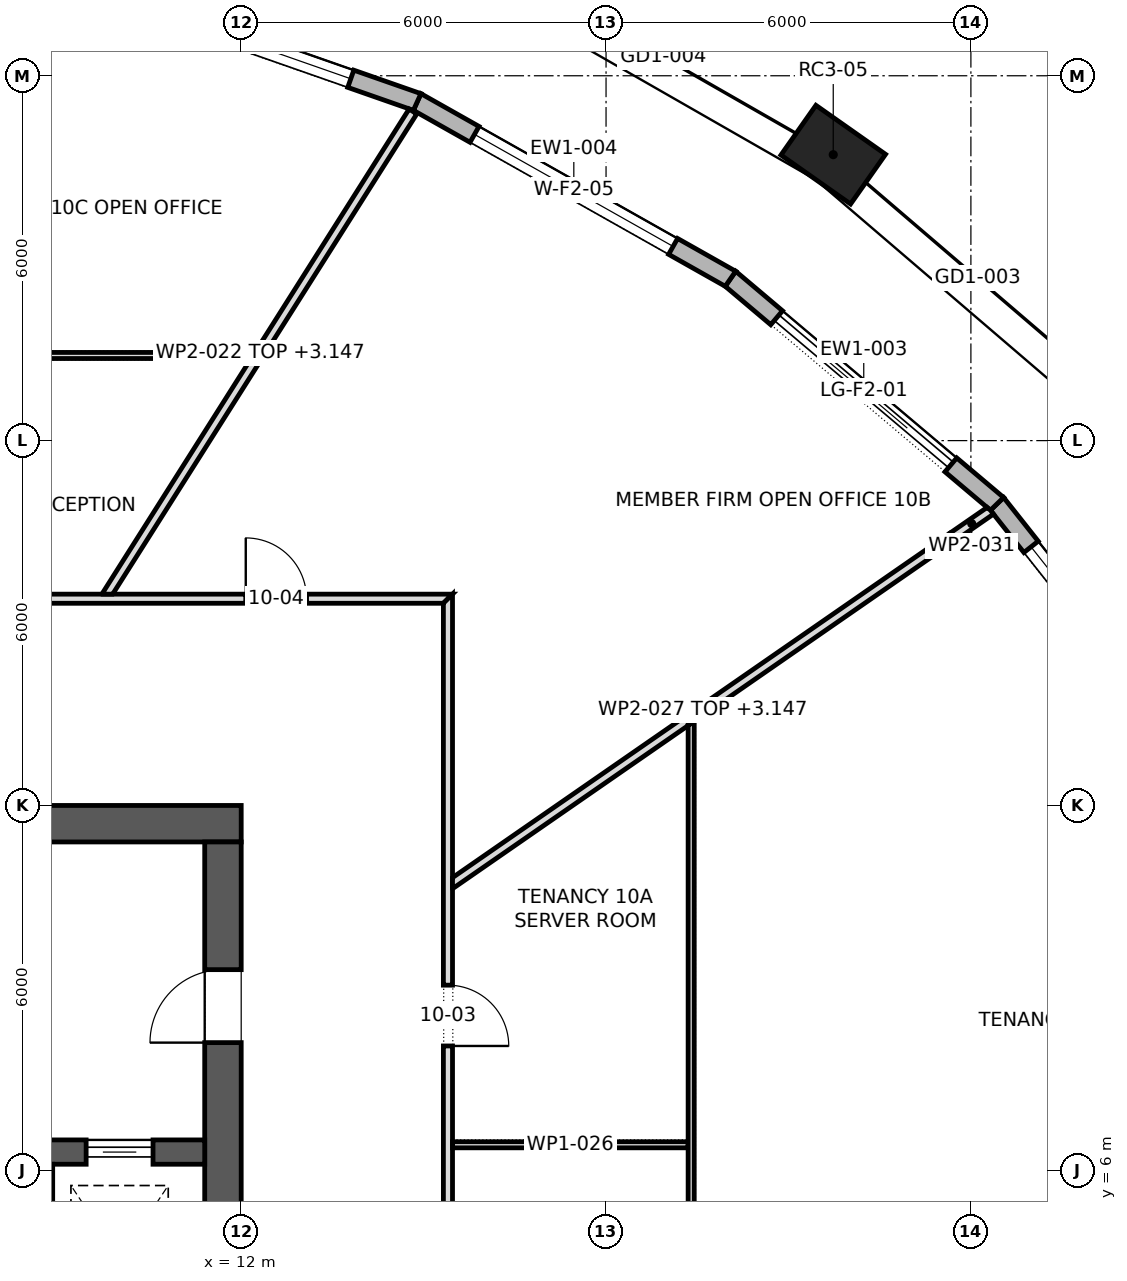
"""IFC4 building model, lengths in metres.
Left out: names, types, materials, properties, quantities, classifications, styles, units other than length and angle.
Written with IfcOpenShell. Run it as: python <this file> out.ifc"""

import sys

from ifc_helpers import new_model, si_unit, direction, frame, frame_2d, origin, origin_2d, place, context, subcontext, project, spatial, polyline, rectangle, outline, extrude, element, fill, save


model = new_model("IFC4")
c1 = context("Model", 3, precision=1e-05, world=origin(), true_north=direction((0.0, 1.0)))
c2 = subcontext(c1, "Body", "Model", "MODEL_VIEW")
j1 = project(units=[si_unit("LENGTHUNIT", "METRE"), si_unit("PLANEANGLEUNIT", "RADIAN")], contexts=[c1])
p1 = place(None, origin())
s1 = spatial("IfcSite", under=j1, at=p1, CompositionType="ELEMENT")
p2 = place(p1, origin())
s2 = spatial("IfcBuilding", under=s1, at=p2, CompositionType="ELEMENT")
p3 = place(p2, frame((0.0, 0.0, 142.3)))
s3 = spatial("IfcBuildingStorey", under=s2, at=p3, CompositionType="ELEMENT", Elevation=142.3)
p4 = place(p3, frame((21.736, 22.702, 0.0), z_axis=(0.0, 0.0, 1.0), x_axis=(-0.817907783846, 0.57534933486, 0.0)))
e1 = element("IfcColumn", 1, at=p4, inside=s3, PredefinedType="COLUMN", context=c2, shape_type="SweptSolid", body=[
    extrude(rectangle(XDim=1.4, YDim=1.0, at=origin_2d()), origin(), (0.0, 0.0, 1.0), 4.2),
])
p5 = place(p3, frame((-12.0, 11.7, 0.0), z_axis=(0.0, 0.0, 1.0), x_axis=(1.0, 0.0, 0.0)))
e2 = element("IfcWall", 2, at=p5, inside=s3, PredefinedType="SHEAR", context=c2, shape_type="SweptSolid", body=[
    extrude(rectangle(XDim=24.0, YDim=0.6, at=frame_2d((12.0, 0.0))), origin(), (0.0, 0.0, 1.0), 4.2),
])
p6 = place(p5, frame((9.225, 0.0, 0.0)))
e3 = element("IfcOpeningElement", 3, at=p6, cuts=e2, PredefinedType="OPENING", context=c2, shape_type="SweptSolid", body=[
    extrude(rectangle(XDim=0.9, YDim=2.1, at=frame_2d((0.45, 1.05))), frame((0.0, 0.312, 0.0), z_axis=(0.0, -1.0, 0.0), x_axis=(1.0, 0.0, 0.0)), (0.0, 0.0, 1.0), 0.624),
])
p7 = place(p5, frame((10.925, 0.0, 0.0)))
e4 = element("IfcOpeningElement", 4, at=p7, cuts=e2, PredefinedType="OPENING", context=c2, shape_type="SweptSolid", body=[
    extrude(rectangle(XDim=0.8, YDim=2.1, at=frame_2d((0.4, 1.05))), frame((0.0, 0.312, 0.0), z_axis=(0.0, -1.0, 0.0), x_axis=(1.0, 0.0, 0.0)), (0.0, 0.0, 1.0), 0.624),
])
p8 = place(p5, frame((4.2, 0.0, 0.0)))
e5 = element("IfcOpeningElement", 5, at=p8, cuts=e2, PredefinedType="OPENING", context=c2, shape_type="SweptSolid", body=[
    extrude(rectangle(XDim=0.8, YDim=2.1, at=frame_2d((0.4, 1.05))), frame((0.0, 0.312, 0.0), z_axis=(0.0, -1.0, 0.0), x_axis=(1.0, 0.0, 0.0)), (0.0, 0.0, 1.0), 0.624),
])
p9 = place(p5, frame((13.8, 0.0, 0.0)))
e6 = element("IfcOpeningElement", 6, at=p9, cuts=e2, PredefinedType="OPENING", context=c2, shape_type="SweptSolid", body=[
    extrude(rectangle(XDim=0.8, YDim=2.1, at=frame_2d((0.4, 1.05))), frame((0.0, 0.312, 0.0), z_axis=(0.0, -1.0, 0.0), x_axis=(1.0, 0.0, 0.0)), (0.0, 0.0, 1.0), 0.624),
])
p10 = place(p5, frame((16.6, 0.0, 0.0)))
e7 = element("IfcOpeningElement", 7, at=p10, cuts=e2, PredefinedType="OPENING", context=c2, shape_type="SweptSolid", body=[
    extrude(rectangle(XDim=0.8, YDim=2.1, at=frame_2d((0.4, 1.05))), frame((0.0, 0.312, 0.0), z_axis=(0.0, -1.0, 0.0), x_axis=(1.0, 0.0, 0.0)), (0.0, 0.0, 1.0), 0.624),
])
p11 = place(p3, frame((11.7, -11.4, 0.0), z_axis=(0.0, 0.0, 1.0), x_axis=(0.0, 1.0, 0.0)))
e8 = element("IfcWall", 8, at=p11, inside=s3, PredefinedType="SHEAR", context=c2, shape_type="SweptSolid", body=[
    extrude(rectangle(XDim=22.8, YDim=0.6, at=frame_2d((11.4, 0.0))), origin(), (0.0, 0.0, 1.0), 4.2),
])
p12 = place(p11, frame((10.2, 0.0, 0.0)))
e9 = element("IfcOpeningElement", 9, at=p12, cuts=e8, PredefinedType="OPENING", context=c2, shape_type="SweptSolid", body=[
    extrude(rectangle(XDim=2.4, YDim=2.1, at=frame_2d((1.2, 1.05))), frame((0.0, 0.312, 0.0), z_axis=(0.0, -1.0, 0.0), x_axis=(1.0, 0.0, 0.0)), (0.0, 0.0, 1.0), 0.624),
])
p13 = place(p11, frame((19.5, 0.0, 0.0)))
e10 = element("IfcOpeningElement", 10, at=p13, cuts=e8, PredefinedType="OPENING", context=c2, shape_type="SweptSolid", body=[
    extrude(rectangle(XDim=1.2, YDim=2.1, at=frame_2d((0.6, 1.05))), frame((0.0, 0.312, 0.0), z_axis=(0.0, -1.0, 0.0), x_axis=(1.0, 0.0, 0.0)), (0.0, 0.0, 1.0), 0.624),
])
p14 = place(p11, frame((2.1, 0.0, 0.0)))
e11 = element("IfcOpeningElement", 11, at=p14, cuts=e8, PredefinedType="OPENING", context=c2, shape_type="SweptSolid", body=[
    extrude(rectangle(XDim=1.2, YDim=2.1, at=frame_2d((0.6, 1.05))), frame((0.0, 0.312, 0.0), z_axis=(0.0, -1.0, 0.0), x_axis=(1.0, 0.0, 0.0)), (0.0, 0.0, 1.0), 0.624),
])
p15 = place(p3, frame((-11.4, 6.3, 0.0), z_axis=(0.0, 0.0, 1.0), x_axis=(1.0, 0.0, 0.0)))
e12 = element("IfcWall", 12, at=p15, inside=s3, PredefinedType="SHEAR", context=c2, shape_type="SweptSolid", body=[
    extrude(rectangle(XDim=22.8, YDim=0.4, at=frame_2d((11.4, 0.0))), origin(), (0.0, 0.0, 1.0), 4.2),
])
p16 = place(p15, frame((20.85, 0.0, 0.0)))
e13 = element("IfcOpeningElement", 13, at=p16, cuts=e12, PredefinedType="OPENING", context=c2, shape_type="SweptSolid", body=[
    extrude(rectangle(XDim=1.1, YDim=2.1, at=frame_2d((0.55, 1.05))), frame((0.0, 0.212, 0.0), z_axis=(0.0, -1.0, 0.0), x_axis=(1.0, 0.0, 0.0)), (0.0, 0.0, 1.0), 0.424),
])
p17 = place(p3, frame((8.75, 3.2, 0.0), z_axis=(0.0, 0.0, 1.0), x_axis=(0.0, 1.0, 0.0)))
e14 = element("IfcWall", 14, at=p17, inside=s3, PredefinedType="SHEAR", context=c2, shape_type="SweptSolid", body=[
    extrude(rectangle(XDim=2.9, YDim=0.3, at=frame_2d((1.45, 0.0))), origin(), (0.0, 0.0, 1.0), 4.2),
])
p18 = place(p3, frame((27.876, 12.605, 0.0), z_axis=(0.0, 0.0, 1.0), x_axis=(-0.620520511988, 0.784190215574, 0.0)))
e15 = element("IfcWall", 15, at=p18, inside=s3, PredefinedType="STANDARD", context=c2, shape_type="SweptSolid", body=[
    extrude(outline(polyline([(-0.016, -0.15), (5.569, -0.15), (5.538, 0.15), (0.016, 0.15), (-0.016, -0.15)])), origin(), (0.0, 0.0, 1.0), 3.9),
])
p19 = place(p18, frame((0.902, 0.0, 0.6)))
e16 = element("IfcOpeningElement", 16, at=p19, cuts=e15, PredefinedType="OPENING", context=c2, shape_type="SweptSolid", body=[
    extrude(rectangle(XDim=3.75, YDim=2.85, at=frame_2d((1.875, 1.425))), frame((0.0, 0.162, 0.0), z_axis=(0.0, -1.0, 0.0), x_axis=(1.0, 0.0, 0.0)), (0.0, 0.0, 1.0), 0.324),
])
p20 = place(p3, frame((24.43, 16.96, 0.0), z_axis=(0.0, 0.0, 1.0), x_axis=(-0.764047627809, 0.64515984255, 0.0)))
e17 = element("IfcWall", 17, at=p20, inside=s3, PredefinedType="STANDARD", context=c2, shape_type="SweptSolid", body=[
    extrude(outline(polyline([(-0.015, -0.15), (5.752, -0.15), (5.723, 0.15), (0.015, 0.15), (-0.015, -0.15)])), origin(), (0.0, 0.0, 1.0), 3.9),
])
p21 = place(p20, frame((0.994, 0.0, 0.0)))
e18 = element("IfcOpeningElement", 18, at=p21, cuts=e17, PredefinedType="OPENING", context=c2, shape_type="SweptSolid", body=[
    extrude(rectangle(XDim=3.75, YDim=3.45, at=frame_2d((1.875, 1.725))), frame((0.0, 0.162, 0.0), z_axis=(0.0, -1.0, 0.0), x_axis=(1.0, 0.0, 0.0)), (0.0, 0.0, 1.0), 0.324),
])
p22 = place(p3, frame((20.046, 20.661, 0.0), z_axis=(0.0, 0.0, 1.0), x_axis=(-0.870912346166, 0.491438384028, 0.0)))
e19 = element("IfcWall", 19, at=p22, inside=s3, PredefinedType="STANDARD", context=c2, shape_type="SweptSolid", body=[
    extrude(outline(polyline([(-0.014, -0.15), (5.929, -0.15), (5.902, 0.15), (0.014, 0.15), (-0.014, -0.15)])), origin(), (0.0, 0.0, 1.0), 3.9),
])
p23 = place(p22, frame((1.083, 0.0, 0.6)))
e20 = element("IfcOpeningElement", 20, at=p23, cuts=e19, PredefinedType="OPENING", context=c2, shape_type="SweptSolid", body=[
    extrude(rectangle(XDim=3.75, YDim=2.85, at=frame_2d((1.875, 1.425))), frame((0.0, 0.162, 0.0), z_axis=(0.0, -1.0, 0.0), x_axis=(1.0, 0.0, 0.0)), (0.0, 0.0, 1.0), 0.324),
])
p24 = place(p3, frame((14.894, 23.569, 0.0), z_axis=(0.0, 0.0, 1.0), x_axis=(-0.943925510212, 0.330158494016, 0.0)))
e21 = element("IfcWall", 21, at=p24, inside=s3, PredefinedType="STANDARD", context=c2, shape_type="SweptSolid", body=[
    extrude(outline(polyline([(-0.013, -0.15), (6.076, -0.15), (6.05, 0.15), (0.013, 0.15), (-0.013, -0.15)])), origin(), (0.0, 0.0, 1.0), 3.9),
])
p25 = place(p24, frame((1.156, 0.0, 0.6)))
e22 = element("IfcOpeningElement", 22, at=p25, cuts=e21, PredefinedType="OPENING", context=c2, shape_type="SweptSolid", body=[
    extrude(rectangle(XDim=3.75, YDim=2.85, at=frame_2d((1.875, 1.425))), frame((0.0, 0.162, 0.0), z_axis=(0.0, -1.0, 0.0), x_axis=(1.0, 0.0, 0.0)), (0.0, 0.0, 1.0), 0.324),
])
p26 = place(p3, frame((-15.475, 15.4, 0.0), z_axis=(0.0, 0.0, 1.0), x_axis=(1.0, 0.0, 0.0)))
e23 = element("IfcWall", 23, at=p26, inside=s3, PredefinedType="PARTITIONING", context=c2, shape_type="SweptSolid", body=[
    extrude(outline(polyline([(0.15, -0.075), (2.066, -0.075), (3.981, -0.075), (5.897, -0.075), (7.812, -0.075), (9.728, -0.075), (11.644, -0.075), (13.56, -0.075), (15.475, -0.075), (17.391, -0.075), (19.306, -0.075), (21.222, -0.075), (23.138, -0.075), (25.053, -0.075), (26.969, -0.075), (28.885, -0.075), (30.8, -0.075), (30.95, 0.075), (29.016, 0.075), (27.081, 0.075), (25.147, 0.075), (23.212, 0.075), (21.278, 0.075), (19.344, 0.075), (17.409, 0.075), (15.475, 0.075), (13.541, 0.075), (11.606, 0.075), (9.672, 0.075), (7.738, 0.075), (5.803, 0.075), (3.869, 0.075), (1.935, 0.075), (0.0, 0.075), (0.15, -0.075)])), origin(), (0.0, 0.0, 1.0), 3.9),
])
p27 = place(p26, frame((27.55, 0.0, 0.0)))
e24 = element("IfcOpeningElement", 24, at=p27, cuts=e23, PredefinedType="OPENING", context=c2, shape_type="SweptSolid", body=[
    extrude(rectangle(XDim=1.0, YDim=2.1, at=frame_2d((0.5, 1.05))), frame((0.0, 0.087, 0.0), z_axis=(0.0, -1.0, 0.0), x_axis=(1.0, 0.0, 0.0)), (0.0, 0.0, 1.0), 0.174),
])
p28 = place(p26, frame((20.75, 0.0, 0.0)))
e25 = element("IfcOpeningElement", 25, at=p28, cuts=e23, PredefinedType="OPENING", context=c2, shape_type="SweptSolid", body=[
    extrude(rectangle(XDim=1.0, YDim=2.1, at=frame_2d((0.5, 1.05))), frame((0.0, 0.087, 0.0), z_axis=(0.0, -1.0, 0.0), x_axis=(1.0, 0.0, 0.0)), (0.0, 0.0, 1.0), 0.174),
])
p29 = place(p26, frame((13.11, 0.0, 0.0)))
e26 = element("IfcOpeningElement", 26, at=p29, cuts=e23, PredefinedType="OPENING", context=c2, shape_type="SweptSolid", body=[
    extrude(rectangle(XDim=1.0, YDim=2.1, at=frame_2d((0.5, 1.05))), frame((0.0, 0.087, 0.0), z_axis=(0.0, -1.0, 0.0), x_axis=(1.0, 0.0, 0.0)), (0.0, 0.0, 1.0), 0.174),
])
p30 = place(p26, frame((4.725, 0.0, 0.0)))
e27 = element("IfcOpeningElement", 27, at=p30, cuts=e23, PredefinedType="OPENING", context=c2, shape_type="SweptSolid", body=[
    extrude(rectangle(XDim=1.0, YDim=2.1, at=frame_2d((0.5, 1.05))), frame((0.0, 0.087, 0.0), z_axis=(0.0, -1.0, 0.0), x_axis=(1.0, 0.0, 0.0)), (0.0, 0.0, 1.0), 0.174),
])
p31 = place(p3, frame((2.34, 19.4, 0.0), z_axis=(0.0, 0.0, 1.0), x_axis=(1.0, 0.0, 0.0)))
e28 = element("IfcWall", 28, at=p31, inside=s3, PredefinedType="PARTITIONING", context=c2, shape_type="SweptSolid", body=[
    extrude(outline(polyline([(0.0, -0.05), (1.965, -0.05), (3.929, -0.05), (5.894, -0.05), (7.858, -0.05), (9.823, -0.05), (9.885, 0.049), (9.885, 0.05), (7.91, 0.05), (5.934, 0.05), (3.958, 0.05), (1.982, 0.05), (0.006, 0.05), (0.011, 0.049), (0.0, -0.046), (0.0, -0.05)])), origin(), (0.0, 0.0, 1.0), 3.9),
])
p32 = place(p31, frame((4.485, 0.0, 0.0)))
e29 = element("IfcOpeningElement", 29, at=p32, cuts=e28, PredefinedType="OPENING", context=c2, shape_type="SweptSolid", body=[
    extrude(rectangle(XDim=0.9, YDim=2.1, at=frame_2d((0.45, 1.05))), frame((0.0, 0.062, 0.0), z_axis=(0.0, -1.0, 0.0), x_axis=(1.0, 0.0, 0.0)), (0.0, 0.0, 1.0), 0.124),
])
p33 = place(p3, frame((9.772, 15.435, 0.0), z_axis=(0.0, 0.0, 1.0), x_axis=(0.535018864906, 0.844840111616, 0.0)))
e30 = element("IfcWall", 30, at=p33, inside=s3, PredefinedType="PARTITIONING", context=c2, shape_type="SweptSolid", body=[
    extrude(outline(polyline([(9.443, 0.075), (7.863, 0.075), (6.283, 0.075), (4.704, 0.075), (4.62, 0.022), (4.586, 0.075), (3.058, 0.075), (1.529, 0.075), (0.0, 0.075), (0.0, 0.075), (0.095, -0.075), (1.964, -0.075), (3.834, -0.075), (5.703, -0.075), (7.573, -0.075), (9.443, -0.075), (9.443, 0.075)])), origin(), (0.0, 0.0, 1.0), 3.147),
])
p34 = place(p3, frame((15.4, -15.475, 0.0), z_axis=(0.0, 0.0, 1.0), x_axis=(0.0, 1.0, 0.0)))
e31 = element("IfcWall", 31, at=p34, inside=s3, PredefinedType="PARTITIONING", context=c2, shape_type="SweptSolid", body=[
    extrude(outline(polyline([(0.0, -0.075), (1.935, -0.075), (3.869, -0.075), (5.803, -0.075), (7.738, -0.075), (9.672, -0.075), (11.606, -0.075), (13.541, -0.075), (15.475, -0.075), (17.409, -0.075), (19.344, -0.075), (21.278, -0.075), (23.212, -0.075), (25.147, -0.075), (27.081, -0.075), (29.016, -0.075), (30.95, -0.075), (30.8, 0.075), (28.885, 0.075), (26.969, 0.075), (25.053, 0.075), (23.138, 0.075), (21.222, 0.075), (19.306, 0.075), (17.391, 0.075), (15.475, 0.075), (13.56, 0.075), (11.644, 0.075), (9.728, 0.075), (7.812, 0.075), (5.897, 0.075), (3.981, 0.075), (2.066, 0.075), (0.15, 0.075), (0.0, -0.075)])), origin(), (0.0, 0.0, 1.0), 3.9),
])
p35 = place(p34, frame((10.15, 0.0, 0.0)))
e32 = element("IfcOpeningElement", 32, at=p35, cuts=e31, PredefinedType="OPENING", context=c2, shape_type="SweptSolid", body=[
    extrude(rectangle(XDim=1.0, YDim=2.1, at=frame_2d((0.5, 1.05))), frame((0.0, 0.087, 0.0), z_axis=(0.0, -1.0, 0.0), x_axis=(1.0, 0.0, 0.0)), (0.0, 0.0, 1.0), 0.174),
])
p36 = place(p34, frame((16.835, 0.0, 0.0)))
e33 = element("IfcOpeningElement", 33, at=p36, cuts=e31, PredefinedType="OPENING", context=c2, shape_type="SweptSolid", body=[
    extrude(rectangle(XDim=1.0, YDim=2.1, at=frame_2d((0.5, 1.05))), frame((0.0, 0.087, 0.0), z_axis=(0.0, -1.0, 0.0), x_axis=(1.0, 0.0, 0.0)), (0.0, 0.0, 1.0), 0.174),
])
p37 = place(p34, frame((23.52, 0.0, 0.0)))
e34 = element("IfcOpeningElement", 34, at=p37, cuts=e31, PredefinedType="OPENING", context=c2, shape_type="SweptSolid", body=[
    extrude(rectangle(XDim=1.0, YDim=2.1, at=frame_2d((0.5, 1.05))), frame((0.0, 0.087, 0.0), z_axis=(0.0, -1.0, 0.0), x_axis=(1.0, 0.0, 0.0)), (0.0, 0.0, 1.0), 0.174),
])
p38 = place(p3, frame((15.475, 6.42, 0.0), z_axis=(0.0, 0.0, 1.0), x_axis=(1.0, 0.0, 0.0)))
e35 = element("IfcWall", 35, at=p38, inside=s3, PredefinedType="PARTITIONING", context=c2, shape_type="SweptSolid", body=[
    extrude(rectangle(XDim=3.875, YDim=0.1, at=frame_2d((1.938, 0.0))), origin(), (0.0, 0.0, 1.0), 3.9),
])
p39 = place(p3, frame((15.433, 10.692, 0.0), z_axis=(0.0, 0.0, 1.0), x_axis=(0.822113566053, 0.569323532372, 0.0)))
e36 = element("IfcWall", 36, at=p39, inside=s3, PredefinedType="PARTITIONING", context=c2, shape_type="SweptSolid", body=[
    extrude(outline(polyline([(0.0, -0.075), (1.571, -0.075), (3.142, -0.075), (4.713, -0.075), (4.715, -0.072), (4.719, -0.075), (6.5, -0.075), (8.281, -0.075), (10.062, -0.075), (10.062, 0.075), (8.07, 0.075), (6.078, 0.075), (4.087, 0.075), (2.095, 0.075), (0.104, 0.075), (0.0, -0.074), (0.0, -0.075)])), origin(), (0.0, 0.0, 1.0), 3.147),
])
p40 = place(p3, frame((19.4, -8.697, 0.0), z_axis=(0.0, 0.0, 1.0), x_axis=(0.0, 1.0, 0.0)))
e37 = element("IfcWall", 37, at=p40, inside=s3, PredefinedType="PARTITIONING", context=c2, shape_type="SweptSolid", body=[
    extrude(outline(polyline([(22.08, -0.05), (22.08, -0.05), (22.01, 0.05), (20.3, 0.05), (18.589, 0.05), (16.877, 0.05), (15.167, 0.05), (15.167, 0.05), (15.067, 0.05), (15.067, 0.05), (13.262, 0.05), (11.458, 0.05), (9.655, 0.05), (7.851, 0.05), (6.047, 0.05), (6.047, 0.05), (5.947, 0.05), (5.947, 0.05), (3.979, 0.05), (2.012, 0.05), (0.045, 0.05), (0.0, -0.049), (0.0, -0.05), (1.84, -0.05), (3.68, -0.05), (5.52, -0.05), (7.36, -0.05), (9.2, -0.05), (11.04, -0.05), (12.88, -0.05), (14.72, -0.05), (16.56, -0.05), (18.4, -0.05), (20.24, -0.05), (22.08, -0.05)])), origin(), (0.0, 0.0, 1.0), 3.9),
])
p41 = place(p40, frame((7.701, 0.0, 0.0)))
e38 = element("IfcOpeningElement", 38, at=p41, cuts=e37, PredefinedType="OPENING", context=c2, shape_type="SweptSolid", body=[
    extrude(rectangle(XDim=0.9, YDim=2.1, at=frame_2d((0.45, 1.05))), frame((0.0, 0.062, 0.0), z_axis=(0.0, -1.0, 0.0), x_axis=(1.0, 0.0, 0.0)), (0.0, 0.0, 1.0), 0.124),
])
p42 = place(p3, frame((23.704, 16.421, 0.0), z_axis=(0.0, 0.0, 1.0), x_axis=(0.822076434515, 0.569377147253, 0.0)))
e39 = element("IfcWall", 39, at=p42, inside=s3, PredefinedType="PARTITIONING", context=c2, shape_type="SweptSolid", body=[
    extrude(outline(polyline([(0.759, -0.075), (0.759, -0.069), (0.754, 0.006), (0.736, 0.075), (0.0, 0.075), (0.0, -0.075), (0.759, -0.075)])), origin(), (0.0, 0.0, 1.0), 3.9),
])
p43 = place(p19, origin())
e40 = element("IfcWindow", 40, at=p43, inside=s3, PartitioningType="TRIPLE_PANEL_VERTICAL", PredefinedType="WINDOW", context=c2, shape_type="SweptSolid", body=[
    extrude(rectangle(XDim=3.75, YDim=2.85, at=frame_2d((1.875, 1.425))), frame((0.0, 0.03, 0.0), z_axis=(0.0, -1.0, 0.0), x_axis=(1.0, 0.0, 0.0)), (0.0, 0.0, 1.0), 0.06),
])
fill(e16, e40)
p44 = place(p21, origin())
e41 = element("IfcDoor", 41, at=p44, inside=s3, OperationType="DOUBLE_DOOR_SLIDING", PredefinedType="DOOR", context=c2, shape_type="SweptSolid", body=[
    extrude(rectangle(XDim=3.75, YDim=3.45, at=frame_2d((1.875, 1.725))), frame((0.0, 0.025, 0.0), z_axis=(0.0, -1.0, 0.0), x_axis=(1.0, 0.0, 0.0)), (0.0, 0.0, 1.0), 0.05),
])
fill(e18, e41)
p45 = place(p23, origin())
e42 = element("IfcWindow", 42, at=p45, inside=s3, PartitioningType="TRIPLE_PANEL_VERTICAL", PredefinedType="WINDOW", context=c2, shape_type="SweptSolid", body=[
    extrude(rectangle(XDim=3.75, YDim=2.85, at=frame_2d((1.875, 1.425))), frame((0.0, 0.03, 0.0), z_axis=(0.0, -1.0, 0.0), x_axis=(1.0, 0.0, 0.0)), (0.0, 0.0, 1.0), 0.06),
])
fill(e20, e42)
p46 = place(p25, origin())
e43 = element("IfcWindow", 43, at=p46, inside=s3, PartitioningType="TRIPLE_PANEL_VERTICAL", PredefinedType="WINDOW", context=c2, shape_type="SweptSolid", body=[
    extrude(rectangle(XDim=3.75, YDim=2.85, at=frame_2d((1.875, 1.425))), frame((0.0, 0.03, 0.0), z_axis=(0.0, -1.0, 0.0), x_axis=(1.0, 0.0, 0.0)), (0.0, 0.0, 1.0), 0.06),
])
fill(e22, e43)
p47 = place(p16, origin())
e44 = element("IfcDoor", 44, at=p47, inside=s3, OperationType="SLIDING_TO_LEFT", PredefinedType="DOOR", context=c2, shape_type="SweptSolid", body=[
    extrude(rectangle(XDim=1.1, YDim=2.1, at=frame_2d((0.55, 1.05))), frame((0.0, 0.025, 0.0), z_axis=(0.0, -1.0, 0.0), x_axis=(1.0, 0.0, 0.0)), (0.0, 0.0, 1.0), 0.05),
])
fill(e13, e44)
p48 = place(p13, origin())
e45 = element("IfcDoor", 45, at=p48, inside=s3, OperationType="SINGLE_SWING_RIGHT", PredefinedType="DOOR", context=c2, shape_type="SweptSolid", body=[
    extrude(rectangle(XDim=1.2, YDim=2.1, at=frame_2d((0.6, 1.05))), frame((0.0, 0.025, 0.0), z_axis=(0.0, -1.0, 0.0), x_axis=(1.0, 0.0, 0.0)), (0.0, 0.0, 1.0), 0.05),
])
fill(e10, e45)
p49 = place(p37, frame((1.0, 0.0, 0.0), z_axis=(0.0, 0.0, 1.0), x_axis=(-1.0, 0.0, 0.0)))
e46 = element("IfcDoor", 46, at=p49, inside=s3, OperationType="SINGLE_SWING_LEFT", PredefinedType="DOOR", context=c2, shape_type="SweptSolid", body=[
    extrude(rectangle(XDim=1.0, YDim=2.1, at=frame_2d((0.5, 1.05))), frame((0.0, 0.025, 0.0), z_axis=(0.0, -1.0, 0.0), x_axis=(1.0, 0.0, 0.0)), (0.0, 0.0, 1.0), 0.05),
])
fill(e34, e46)
p50 = place(p27, origin())
e47 = element("IfcDoor", 47, at=p50, inside=s3, OperationType="SINGLE_SWING_RIGHT", PredefinedType="DOOR", context=c2, shape_type="SweptSolid", body=[
    extrude(rectangle(XDim=1.0, YDim=2.1, at=frame_2d((0.5, 1.05))), frame((0.0, 0.025, 0.0), z_axis=(0.0, -1.0, 0.0), x_axis=(1.0, 0.0, 0.0)), (0.0, 0.0, 1.0), 0.05),
])
fill(e24, e47)
save(model, sys.argv[1])
